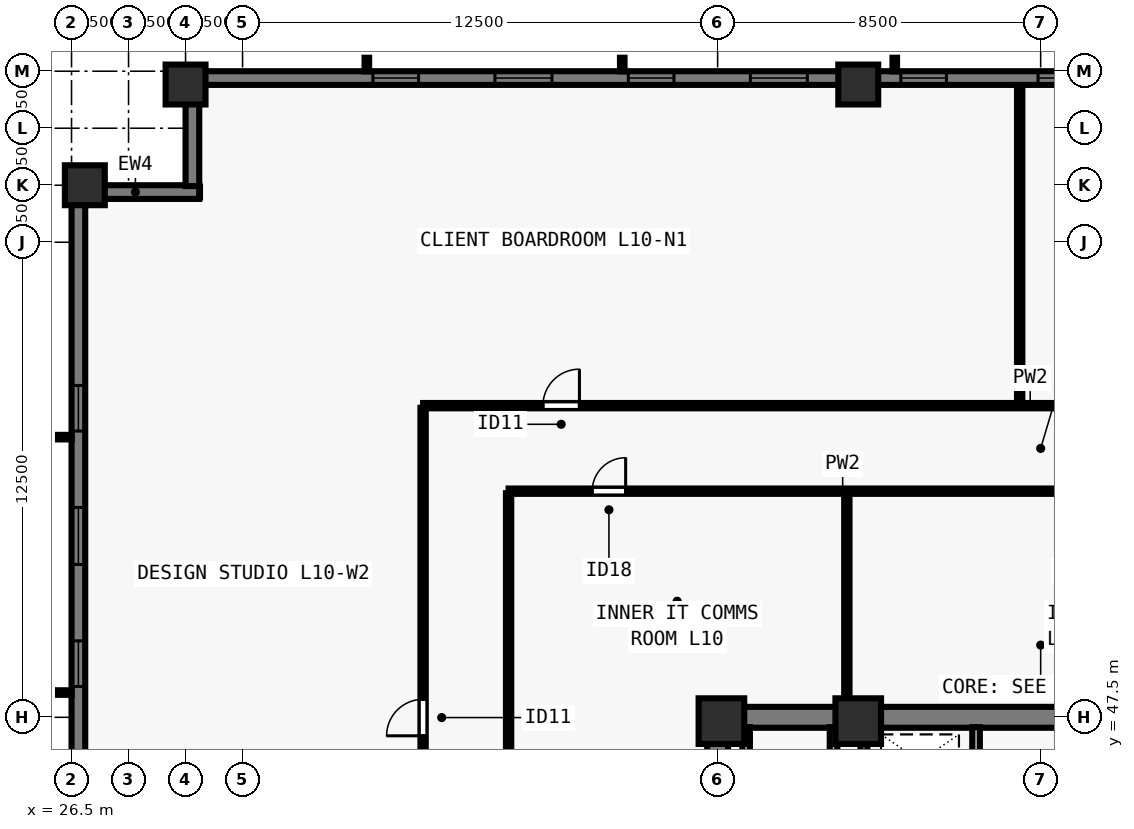
"""IFC4 building model, lengths in metres.
Left out: names, types, materials, properties, quantities, classifications, styles, units other than length and angle.
Written with IfcOpenShell. Run it as: python <this file> out.ifc"""

import sys

from ifc_helpers import new_model, si_unit, direction, frame, frame_2d, origin, origin_2d, place, context, subcontext, project, spatial, rectangle, extrude, element, fill, save


model = new_model("IFC4")
c1 = context("Model", 3, precision=1e-05, world=origin(), true_north=direction((0.0, 1.0)))
c2 = subcontext(c1, "Body", "Model", "MODEL_VIEW")
j1 = project(units=[si_unit("LENGTHUNIT", "METRE"), si_unit("PLANEANGLEUNIT", "RADIAN")], contexts=[c1])
p1 = place(None, origin())
s1 = spatial("IfcSite", under=j1, at=p1, CompositionType="ELEMENT")
p2 = place(p1, origin())
s2 = spatial("IfcBuilding", under=s1, at=p2, CompositionType="ELEMENT")
p3 = place(p2, frame((0.0, 0.0, 41.0)))
s3 = spatial("IfcBuildingStorey", under=s2, at=p3, CompositionType="ELEMENT", Elevation=41.0)
for number, where, z_axis, x_axis in (
    (1, (43.6, 47.4, 0.0), (0.0, 0.0, 1.0), (1.0, 0.0, 0.0)),
    (2, (47.2, 47.4, 0.0), (0.0, 0.0, 1.0), (1.0, 0.0, 0.0)),
):
    element("IfcColumn", number, at=place(p3, frame(where, z_axis=z_axis, x_axis=x_axis)), inside=s3, PredefinedType="COLUMN", context=c2, shape_type="SweptSolid", body=[
        extrude(rectangle(XDim=1.2, YDim=1.2, at=origin_2d()), origin(), (0.0, 0.0, 1.0), 3.5),
    ])
for number, where, z_axis, x_axis in (
    (3, (47.2, 64.15, 0.0), (0.0, 0.0, 1.0), (1.0, 0.0, 0.0)),
    (4, (29.5, 64.15, 0.0), (0.0, 0.0, 1.0), (1.0, 0.0, 0.0)),
    (5, (26.85, 61.5, 0.0), (0.0, 0.0, 1.0), (0.0, 1.0, 0.0)),
):
    element("IfcColumn", number, at=place(p3, frame(where, z_axis=z_axis, x_axis=x_axis)), inside=s3, PredefinedType="COLUMN", context=c2, shape_type="SweptSolid", body=[
        extrude(rectangle(XDim=1.05, YDim=1.05, at=origin_2d()), origin(), (0.0, 0.0, 1.0), 3.5),
    ])
p4 = place(p3, frame((26.68, 16.5, 0.0), z_axis=(0.0, 0.0, 1.0), x_axis=(0.0, 1.0, 0.0)))
e6 = element("IfcWall", 6, at=p4, inside=s3, PredefinedType="SOLIDWALL", context=c2, shape_type="SweptSolid", body=[
    extrude(rectangle(XDim=44.662, YDim=0.36, at=frame_2d((22.331, 0.0))), origin(), (0.0, 0.0, 1.0), 3.28),
])
p5 = place(p4, frame((4.93, 0.0, 0.8)))
e7 = element("IfcOpeningElement", 7, at=p5, cuts=e6, PredefinedType="OPENING", context=c2, shape_type="SweptSolid", body=[
    extrude(rectangle(XDim=1.2, YDim=1.544, at=frame_2d((0.6, 0.772))), frame((0.0, 0.19, 0.0), z_axis=(0.0, -1.0, 0.0), x_axis=(1.0, 0.0, 0.0)), (0.0, 0.0, 1.0), 0.38),
])
p6 = place(p4, frame((8.14, 0.0, 0.8)))
e8 = element("IfcOpeningElement", 8, at=p6, cuts=e6, PredefinedType="OPENING", context=c2, shape_type="SweptSolid", body=[
    extrude(rectangle(XDim=1.5, YDim=1.544, at=frame_2d((0.75, 0.772))), frame((0.0, 0.19, 0.0), z_axis=(0.0, -1.0, 0.0), x_axis=(1.0, 0.0, 0.0)), (0.0, 0.0, 1.0), 0.38),
])
p7 = place(p4, frame((11.65, 0.0, 0.8)))
e9 = element("IfcOpeningElement", 9, at=p7, cuts=e6, PredefinedType="OPENING", context=c2, shape_type="SweptSolid", body=[
    extrude(rectangle(XDim=1.2, YDim=1.544, at=frame_2d((0.6, 0.772))), frame((0.0, 0.19, 0.0), z_axis=(0.0, -1.0, 0.0), x_axis=(1.0, 0.0, 0.0)), (0.0, 0.0, 1.0), 0.38),
])
p8 = place(p4, frame((14.861, 0.0, 0.8)))
e10 = element("IfcOpeningElement", 10, at=p8, cuts=e6, PredefinedType="OPENING", context=c2, shape_type="SweptSolid", body=[
    extrude(rectangle(XDim=1.5, YDim=1.544, at=frame_2d((0.75, 0.772))), frame((0.0, 0.19, 0.0), z_axis=(0.0, -1.0, 0.0), x_axis=(1.0, 0.0, 0.0)), (0.0, 0.0, 1.0), 0.38),
])
p9 = place(p4, frame((18.821, 0.0, 0.8)))
e11 = element("IfcOpeningElement", 11, at=p9, cuts=e6, PredefinedType="OPENING", context=c2, shape_type="SweptSolid", body=[
    extrude(rectangle(XDim=1.2, YDim=1.544, at=frame_2d((0.6, 0.772))), frame((0.0, 0.19, 0.0), z_axis=(0.0, -1.0, 0.0), x_axis=(1.0, 0.0, 0.0)), (0.0, 0.0, 1.0), 0.38),
])
p10 = place(p4, frame((20.731, 0.0, 0.8)))
e12 = element("IfcOpeningElement", 12, at=p10, cuts=e6, PredefinedType="OPENING", context=c2, shape_type="SweptSolid", body=[
    extrude(rectangle(XDim=1.5, YDim=1.544, at=frame_2d((0.75, 0.772))), frame((0.0, 0.19, 0.0), z_axis=(0.0, -1.0, 0.0), x_axis=(1.0, 0.0, 0.0)), (0.0, 0.0, 1.0), 0.38),
])
p11 = place(p4, frame((25.091, 0.0, 0.8)))
e13 = element("IfcOpeningElement", 13, at=p11, cuts=e6, PredefinedType="OPENING", context=c2, shape_type="SweptSolid", body=[
    extrude(rectangle(XDim=1.2, YDim=1.544, at=frame_2d((0.6, 0.772))), frame((0.0, 0.19, 0.0), z_axis=(0.0, -1.0, 0.0), x_axis=(1.0, 0.0, 0.0)), (0.0, 0.0, 1.0), 0.38),
])
p12 = place(p4, frame((28.302, 0.0, 0.8)))
e14 = element("IfcOpeningElement", 14, at=p12, cuts=e6, PredefinedType="OPENING", context=c2, shape_type="SweptSolid", body=[
    extrude(rectangle(XDim=1.5, YDim=1.544, at=frame_2d((0.75, 0.772))), frame((0.0, 0.19, 0.0), z_axis=(0.0, -1.0, 0.0), x_axis=(1.0, 0.0, 0.0)), (0.0, 0.0, 1.0), 0.38),
])
p13 = place(p4, frame((31.812, 0.0, 0.8)))
e15 = element("IfcOpeningElement", 15, at=p13, cuts=e6, PredefinedType="OPENING", context=c2, shape_type="SweptSolid", body=[
    extrude(rectangle(XDim=1.2, YDim=1.544, at=frame_2d((0.6, 0.772))), frame((0.0, 0.19, 0.0), z_axis=(0.0, -1.0, 0.0), x_axis=(1.0, 0.0, 0.0)), (0.0, 0.0, 1.0), 0.38),
])
p14 = place(p4, frame((35.022, 0.0, 0.8)))
e16 = element("IfcOpeningElement", 16, at=p14, cuts=e6, PredefinedType="OPENING", context=c2, shape_type="SweptSolid", body=[
    extrude(rectangle(XDim=1.5, YDim=1.544, at=frame_2d((0.75, 0.772))), frame((0.0, 0.19, 0.0), z_axis=(0.0, -1.0, 0.0), x_axis=(1.0, 0.0, 0.0)), (0.0, 0.0, 1.0), 0.38),
])
p15 = place(p4, frame((38.532, 0.0, 0.8)))
e17 = element("IfcOpeningElement", 17, at=p15, cuts=e6, PredefinedType="OPENING", context=c2, shape_type="SweptSolid", body=[
    extrude(rectangle(XDim=1.2, YDim=1.544, at=frame_2d((0.6, 0.772))), frame((0.0, 0.19, 0.0), z_axis=(0.0, -1.0, 0.0), x_axis=(1.0, 0.0, 0.0)), (0.0, 0.0, 1.0), 0.38),
])
p16 = place(p3, frame((26.5, 61.32, 0.0), z_axis=(0.0, 0.0, 1.0), x_axis=(1.0, 0.0, 0.0)))
e18 = element("IfcWall", 18, at=p16, inside=s3, PredefinedType="SOLIDWALL", context=c2, shape_type="SweptSolid", body=[
    extrude(rectangle(XDim=3.36, YDim=0.36, at=frame_2d((1.68, 0.0))), origin(), (0.0, 0.0, 1.0), 3.28),
])
p17 = place(p3, frame((29.68, 61.478, 0.0), z_axis=(0.0, 0.0, 1.0), x_axis=(0.0, 1.0, 0.0)))
e19 = element("IfcWall", 19, at=p17, inside=s3, PredefinedType="SOLIDWALL", context=c2, shape_type="SweptSolid", body=[
    extrude(rectangle(XDim=2.684, YDim=0.36, at=frame_2d((1.342, 0.0))), origin(), (0.0, 0.0, 1.0), 3.28),
])
p18 = place(p3, frame((29.5, 64.32, 0.0), z_axis=(0.0, 0.0, 1.0), x_axis=(1.0, 0.0, 0.0)))
e20 = element("IfcWall", 20, at=p18, inside=s3, PredefinedType="SOLIDWALL", context=c2, shape_type="SweptSolid", body=[
    extrude(rectangle(XDim=44.662, YDim=0.36, at=frame_2d((22.331, 0.0))), origin(), (0.0, 0.0, 1.0), 3.28),
])
p19 = place(p18, frame((4.93, 0.0, 0.8)))
e21 = element("IfcOpeningElement", 21, at=p19, cuts=e20, PredefinedType="OPENING", context=c2, shape_type="SweptSolid", body=[
    extrude(rectangle(XDim=1.2, YDim=1.544, at=frame_2d((0.6, 0.772))), frame((0.0, 0.19, 0.0), z_axis=(0.0, -1.0, 0.0), x_axis=(1.0, 0.0, 0.0)), (0.0, 0.0, 1.0), 0.38),
])
p20 = place(p18, frame((8.14, 0.0, 0.8)))
e22 = element("IfcOpeningElement", 22, at=p20, cuts=e20, PredefinedType="OPENING", context=c2, shape_type="SweptSolid", body=[
    extrude(rectangle(XDim=1.5, YDim=1.544, at=frame_2d((0.75, 0.772))), frame((0.0, 0.19, 0.0), z_axis=(0.0, -1.0, 0.0), x_axis=(1.0, 0.0, 0.0)), (0.0, 0.0, 1.0), 0.38),
])
p21 = place(p18, frame((11.65, 0.0, 0.8)))
e23 = element("IfcOpeningElement", 23, at=p21, cuts=e20, PredefinedType="OPENING", context=c2, shape_type="SweptSolid", body=[
    extrude(rectangle(XDim=1.2, YDim=1.544, at=frame_2d((0.6, 0.772))), frame((0.0, 0.19, 0.0), z_axis=(0.0, -1.0, 0.0), x_axis=(1.0, 0.0, 0.0)), (0.0, 0.0, 1.0), 0.38),
])
p22 = place(p18, frame((14.861, 0.0, 0.8)))
e24 = element("IfcOpeningElement", 24, at=p22, cuts=e20, PredefinedType="OPENING", context=c2, shape_type="SweptSolid", body=[
    extrude(rectangle(XDim=1.5, YDim=1.544, at=frame_2d((0.75, 0.772))), frame((0.0, 0.19, 0.0), z_axis=(0.0, -1.0, 0.0), x_axis=(1.0, 0.0, 0.0)), (0.0, 0.0, 1.0), 0.38),
])
p23 = place(p18, frame((18.821, 0.0, 0.8)))
e25 = element("IfcOpeningElement", 25, at=p23, cuts=e20, PredefinedType="OPENING", context=c2, shape_type="SweptSolid", body=[
    extrude(rectangle(XDim=1.2, YDim=1.544, at=frame_2d((0.6, 0.772))), frame((0.0, 0.19, 0.0), z_axis=(0.0, -1.0, 0.0), x_axis=(1.0, 0.0, 0.0)), (0.0, 0.0, 1.0), 0.38),
])
p24 = place(p18, frame((22.431, 0.0, 0.8)))
e26 = element("IfcOpeningElement", 26, at=p24, cuts=e20, PredefinedType="OPENING", context=c2, shape_type="SweptSolid", body=[
    extrude(rectangle(XDim=1.5, YDim=1.544, at=frame_2d((0.75, 0.772))), frame((0.0, 0.19, 0.0), z_axis=(0.0, -1.0, 0.0), x_axis=(1.0, 0.0, 0.0)), (0.0, 0.0, 1.0), 0.38),
])
p25 = place(p18, frame((25.091, 0.0, 0.8)))
e27 = element("IfcOpeningElement", 27, at=p25, cuts=e20, PredefinedType="OPENING", context=c2, shape_type="SweptSolid", body=[
    extrude(rectangle(XDim=1.2, YDim=1.544, at=frame_2d((0.6, 0.772))), frame((0.0, 0.19, 0.0), z_axis=(0.0, -1.0, 0.0), x_axis=(1.0, 0.0, 0.0)), (0.0, 0.0, 1.0), 0.38),
])
p26 = place(p18, frame((28.302, 0.0, 0.8)))
e28 = element("IfcOpeningElement", 28, at=p26, cuts=e20, PredefinedType="OPENING", context=c2, shape_type="SweptSolid", body=[
    extrude(rectangle(XDim=1.5, YDim=1.544, at=frame_2d((0.75, 0.772))), frame((0.0, 0.19, 0.0), z_axis=(0.0, -1.0, 0.0), x_axis=(1.0, 0.0, 0.0)), (0.0, 0.0, 1.0), 0.38),
])
p27 = place(p18, frame((31.812, 0.0, 0.8)))
e29 = element("IfcOpeningElement", 29, at=p27, cuts=e20, PredefinedType="OPENING", context=c2, shape_type="SweptSolid", body=[
    extrude(rectangle(XDim=1.2, YDim=1.544, at=frame_2d((0.6, 0.772))), frame((0.0, 0.19, 0.0), z_axis=(0.0, -1.0, 0.0), x_axis=(1.0, 0.0, 0.0)), (0.0, 0.0, 1.0), 0.38),
])
p28 = place(p18, frame((35.022, 0.0, 0.8)))
e30 = element("IfcOpeningElement", 30, at=p28, cuts=e20, PredefinedType="OPENING", context=c2, shape_type="SweptSolid", body=[
    extrude(rectangle(XDim=1.5, YDim=1.544, at=frame_2d((0.75, 0.772))), frame((0.0, 0.19, 0.0), z_axis=(0.0, -1.0, 0.0), x_axis=(1.0, 0.0, 0.0)), (0.0, 0.0, 1.0), 0.38),
])
p29 = place(p18, frame((38.532, 0.0, 0.8)))
e31 = element("IfcOpeningElement", 31, at=p29, cuts=e20, PredefinedType="OPENING", context=c2, shape_type="SweptSolid", body=[
    extrude(rectangle(XDim=1.2, YDim=1.544, at=frame_2d((0.6, 0.772))), frame((0.0, 0.19, 0.0), z_axis=(0.0, -1.0, 0.0), x_axis=(1.0, 0.0, 0.0)), (0.0, 0.0, 1.0), 0.38),
])
p30 = place(p3, frame((43.225, 47.5, 0.0), z_axis=(0.0, 0.0, 1.0), x_axis=(1.0, 0.0, 0.0)))
e32 = element("IfcWall", 32, at=p30, inside=s3, PredefinedType="SHEAR", context=c2, shape_type="SweptSolid", body=[
    extrude(rectangle(XDim=17.55, YDim=0.55, at=frame_2d((8.775, 0.0))), origin(), (0.0, 0.0, 1.0), 3.28),
])
p31 = place(p3, frame((43.5, 40.8, 0.0), z_axis=(0.0, 0.0, 1.0), x_axis=(0.0, 1.0, 0.0)))
e33 = element("IfcWall", 33, at=p31, inside=s3, PredefinedType="SHEAR", context=c2, shape_type="SweptSolid", body=[
    extrude(rectangle(XDim=6.435, YDim=0.55, at=frame_2d((3.218, 0.0))), origin(), (0.0, 0.0, 1.0), 3.28),
])
p32 = place(p3, frame((50.3, 40.585, 0.0), z_axis=(0.0, 0.0, 1.0), x_axis=(0.0, 1.0, 0.0)))
e34 = element("IfcWall", 34, at=p32, inside=s3, PredefinedType="SOLIDWALL", context=c2, shape_type="SweptSolid", body=[
    extrude(rectangle(XDim=6.655, YDim=0.2, at=frame_2d((3.328, 0.0))), origin(), (0.0, 0.0, 1.0), 3.28),
])
p33 = place(p32, frame((5.065, 0.0, 0.0)))
e35 = element("IfcOpeningElement", 35, at=p33, cuts=e34, PredefinedType="OPENING", context=c2, shape_type="SweptSolid", body=[
    extrude(rectangle(XDim=0.8, YDim=2.08, at=frame_2d((0.4, 1.04))), frame((0.0, 0.11, 0.0), z_axis=(0.0, -1.0, 0.0), x_axis=(1.0, 0.0, 0.0)), (0.0, 0.0, 1.0), 0.22),
])
for number, where, z_axis, x_axis in (
    (36, (46.55, 43.735, 0.0), (0.0, 0.0, 1.0), (0.0, 1.0, 0.0)),
    (37, (44.25, 43.735, 0.0), (0.0, 0.0, 1.0), (0.0, 1.0, 0.0)),
):
    element("IfcWall", number, at=place(p3, frame(where, z_axis=z_axis, x_axis=x_axis)), inside=s3, PredefinedType="SOLIDWALL", context=c2, shape_type="SweptSolid", body=[
        extrude(rectangle(XDim=3.505, YDim=0.2, at=frame_2d((1.752, 0.0))), origin(), (0.0, 0.0, 1.0), 3.28),
    ])
p34 = place(p3, frame((47.35, 43.735, 0.0), z_axis=(0.0, 0.0, 1.0), x_axis=(0.0, 1.0, 0.0)))
e38 = element("IfcWall", 38, at=p34, inside=s3, PredefinedType="SOLIDWALL", context=c2, shape_type="SweptSolid", body=[
    extrude(rectangle(XDim=3.505, YDim=0.18, at=frame_2d((1.752, 0.0))), origin(), (0.0, 0.0, 1.0), 3.28),
])
p35 = place(p3, frame((35.75, 55.7, 0.0), z_axis=(0.0, 0.0, 1.0), x_axis=(1.0, 0.0, 0.0)))
e39 = element("IfcWall", 39, at=p35, inside=s3, PredefinedType="PARTITIONING", context=c2, shape_type="SweptSolid", body=[
    extrude(rectangle(XDim=32.5, YDim=0.14, at=frame_2d((16.25, 0.0))), origin(), (0.0, 0.0, 1.0), 3.28),
])
p36 = place(p35, frame((3.154, 0.0, 0.0)))
e40 = element("IfcOpeningElement", 40, at=p36, cuts=e39, PredefinedType="OPENING", context=c2, shape_type="SweptSolid", body=[
    extrude(rectangle(XDim=0.96, YDim=2.12, at=frame_2d((0.48, 1.06))), frame((0.0, 0.08, 0.0), z_axis=(0.0, -1.0, 0.0), x_axis=(1.0, 0.0, 0.0)), (0.0, 0.0, 1.0), 0.16),
])
p37 = place(p35, frame((27.834, 0.0, 0.0)))
e41 = element("IfcOpeningElement", 41, at=p37, cuts=e39, PredefinedType="OPENING", context=c2, shape_type="SweptSolid", body=[
    extrude(rectangle(XDim=0.96, YDim=2.12, at=frame_2d((0.48, 1.06))), frame((0.0, 0.08, 0.0), z_axis=(0.0, -1.0, 0.0), x_axis=(1.0, 0.0, 0.0)), (0.0, 0.0, 1.0), 0.16),
])
p38 = place(p3, frame((35.75, 22.355, 0.0), z_axis=(0.0, 0.0, 1.0), x_axis=(0.0, 1.0, 0.0)))
e42 = element("IfcWall", 42, at=p38, inside=s3, PredefinedType="PARTITIONING", context=c2, shape_type="SweptSolid", body=[
    extrude(rectangle(XDim=33.29, YDim=0.14, at=frame_2d((16.645, 0.0))), origin(), (0.0, 0.0, 1.0), 3.28),
])
p39 = place(p38, frame((8.058, 0.0, 0.0)))
e43 = element("IfcOpeningElement", 43, at=p39, cuts=e42, PredefinedType="OPENING", context=c2, shape_type="SweptSolid", body=[
    extrude(rectangle(XDim=0.96, YDim=2.12, at=frame_2d((0.48, 1.06))), frame((0.0, 0.08, 0.0), z_axis=(0.0, -1.0, 0.0), x_axis=(1.0, 0.0, 0.0)), (0.0, 0.0, 1.0), 0.16),
])
p40 = place(p38, frame((24.658, 0.0, 0.0)))
e44 = element("IfcOpeningElement", 44, at=p40, cuts=e42, PredefinedType="OPENING", context=c2, shape_type="SweptSolid", body=[
    extrude(rectangle(XDim=0.96, YDim=2.12, at=frame_2d((0.48, 1.06))), frame((0.0, 0.08, 0.0), z_axis=(0.0, -1.0, 0.0), x_axis=(1.0, 0.0, 0.0)), (0.0, 0.0, 1.0), 0.16),
])
p41 = place(p3, frame((38.0, 53.45, 0.0), z_axis=(0.0, 0.0, 1.0), x_axis=(1.0, 0.0, 0.0)))
e45 = element("IfcWall", 45, at=p41, inside=s3, PredefinedType="PARTITIONING", context=c2, shape_type="SweptSolid", body=[
    extrude(rectangle(XDim=28.0, YDim=0.14, at=frame_2d((14.0, 0.0))), origin(), (0.0, 0.0, 1.0), 3.28),
])
p42 = place(p41, frame((2.2, 0.0, 0.0)))
e46 = element("IfcOpeningElement", 46, at=p42, cuts=e45, PredefinedType="OPENING", context=c2, shape_type="SweptSolid", body=[
    extrude(rectangle(XDim=0.88, YDim=2.1, at=frame_2d((0.44, 1.05))), frame((0.0, 0.08, 0.0), z_axis=(0.0, -1.0, 0.0), x_axis=(1.0, 0.0, 0.0)), (0.0, 0.0, 1.0), 0.16),
])
p43 = place(p41, frame((14.5, 0.0, 0.0)))
e47 = element("IfcOpeningElement", 47, at=p43, cuts=e45, PredefinedType="OPENING", context=c2, shape_type="SweptSolid", body=[
    extrude(rectangle(XDim=0.88, YDim=2.1, at=frame_2d((0.44, 1.05))), frame((0.0, 0.08, 0.0), z_axis=(0.0, -1.0, 0.0), x_axis=(1.0, 0.0, 0.0)), (0.0, 0.0, 1.0), 0.16),
])
p44 = place(p41, frame((24.0, 0.0, 0.0)))
e48 = element("IfcOpeningElement", 48, at=p44, cuts=e45, PredefinedType="OPENING", context=c2, shape_type="SweptSolid", body=[
    extrude(rectangle(XDim=0.88, YDim=2.1, at=frame_2d((0.44, 1.05))), frame((0.0, 0.08, 0.0), z_axis=(0.0, -1.0, 0.0), x_axis=(1.0, 0.0, 0.0)), (0.0, 0.0, 1.0), 0.16),
])
p45 = place(p3, frame((38.0, 40.8, 0.0), z_axis=(0.0, 0.0, 1.0), x_axis=(0.0, 1.0, 0.0)))
e49 = element("IfcWall", 49, at=p45, inside=s3, PredefinedType="PARTITIONING", context=c2, shape_type="SweptSolid", body=[
    extrude(rectangle(XDim=12.595, YDim=0.14, at=frame_2d((6.297, 0.0))), origin(), (0.0, 0.0, 1.0), 3.28),
])
p46 = place(p45, frame((2.5, 0.0, 0.0)))
e50 = element("IfcOpeningElement", 50, at=p46, cuts=e49, PredefinedType="OPENING", context=c2, shape_type="SweptSolid", body=[
    extrude(rectangle(XDim=0.88, YDim=2.1, at=frame_2d((0.44, 1.05))), frame((0.0, 0.08, 0.0), z_axis=(0.0, -1.0, 0.0), x_axis=(1.0, 0.0, 0.0)), (0.0, 0.0, 1.0), 0.16),
])
p47 = place(p3, frame((46.9, 47.76, 0.0), z_axis=(0.0, 0.0, 1.0), x_axis=(0.0, 1.0, 0.0)))
e51 = element("IfcWall", 51, at=p47, inside=s3, PredefinedType="PARTITIONING", context=c2, shape_type="SweptSolid", body=[
    extrude(rectangle(XDim=5.635, YDim=0.14, at=frame_2d((2.817, 0.0))), origin(), (0.0, 0.0, 1.0), 3.28),
])
p48 = place(p3, frame((51.448, 55.8, 0.0), z_axis=(0.0, 0.0, 1.0), x_axis=(0.0, 1.0, 0.0)))
e52 = element("IfcWall", 52, at=p48, inside=s3, PredefinedType="PARTITIONING", context=c2, shape_type="SweptSolid", body=[
    extrude(rectangle(XDim=8.28, YDim=0.14, at=frame_2d((4.14, 0.0))), origin(), (0.0, 0.0, 1.0), 3.28),
])
p49 = place(p13, origin())
e53 = element("IfcWindow", 53, at=p49, inside=s3, PartitioningType="SINGLE_PANEL", PredefinedType="WINDOW", context=c2, shape_type="SweptSolid", body=[
    extrude(rectangle(XDim=1.2, YDim=1.544, at=frame_2d((0.6, 0.772))), frame((0.0, -0.05, 0.0), z_axis=(0.0, -1.0, 0.0), x_axis=(1.0, 0.0, 0.0)), (0.0, 0.0, 1.0), 0.06),
])
fill(e15, e53)
p50 = place(p14, origin())
e54 = element("IfcWindow", 54, at=p50, inside=s3, PartitioningType="SINGLE_PANEL", PredefinedType="WINDOW", context=c2, shape_type="SweptSolid", body=[
    extrude(rectangle(XDim=1.5, YDim=1.544, at=frame_2d((0.75, 0.772))), frame((0.0, -0.05, 0.0), z_axis=(0.0, -1.0, 0.0), x_axis=(1.0, 0.0, 0.0)), (0.0, 0.0, 1.0), 0.06),
])
fill(e16, e54)
p51 = place(p15, origin())
e55 = element("IfcWindow", 55, at=p51, inside=s3, PartitioningType="SINGLE_PANEL", PredefinedType="WINDOW", context=c2, shape_type="SweptSolid", body=[
    extrude(rectangle(XDim=1.2, YDim=1.544, at=frame_2d((0.6, 0.772))), frame((0.0, -0.05, 0.0), z_axis=(0.0, -1.0, 0.0), x_axis=(1.0, 0.0, 0.0)), (0.0, 0.0, 1.0), 0.06),
])
fill(e17, e55)
p52 = place(p19, origin())
e56 = element("IfcWindow", 56, at=p52, inside=s3, PartitioningType="SINGLE_PANEL", PredefinedType="WINDOW", context=c2, shape_type="SweptSolid", body=[
    extrude(rectangle(XDim=1.2, YDim=1.544, at=frame_2d((0.6, 0.772))), frame((0.0, -0.05, 0.0), z_axis=(0.0, -1.0, 0.0), x_axis=(1.0, 0.0, 0.0)), (0.0, 0.0, 1.0), 0.06),
])
fill(e21, e56)
p53 = place(p20, origin())
e57 = element("IfcWindow", 57, at=p53, inside=s3, PartitioningType="SINGLE_PANEL", PredefinedType="WINDOW", context=c2, shape_type="SweptSolid", body=[
    extrude(rectangle(XDim=1.5, YDim=1.544, at=frame_2d((0.75, 0.772))), frame((0.0, -0.05, 0.0), z_axis=(0.0, -1.0, 0.0), x_axis=(1.0, 0.0, 0.0)), (0.0, 0.0, 1.0), 0.06),
])
fill(e22, e57)
p54 = place(p21, origin())
e58 = element("IfcWindow", 58, at=p54, inside=s3, PartitioningType="SINGLE_PANEL", PredefinedType="WINDOW", context=c2, shape_type="SweptSolid", body=[
    extrude(rectangle(XDim=1.2, YDim=1.544, at=frame_2d((0.6, 0.772))), frame((0.0, -0.05, 0.0), z_axis=(0.0, -1.0, 0.0), x_axis=(1.0, 0.0, 0.0)), (0.0, 0.0, 1.0), 0.06),
])
fill(e23, e58)
p55 = place(p22, origin())
e59 = element("IfcWindow", 59, at=p55, inside=s3, PartitioningType="SINGLE_PANEL", PredefinedType="WINDOW", context=c2, shape_type="SweptSolid", body=[
    extrude(rectangle(XDim=1.5, YDim=1.544, at=frame_2d((0.75, 0.772))), frame((0.0, -0.05, 0.0), z_axis=(0.0, -1.0, 0.0), x_axis=(1.0, 0.0, 0.0)), (0.0, 0.0, 1.0), 0.06),
])
fill(e24, e59)
p56 = place(p23, origin())
e60 = element("IfcWindow", 60, at=p56, inside=s3, PartitioningType="SINGLE_PANEL", PredefinedType="WINDOW", context=c2, shape_type="SweptSolid", body=[
    extrude(rectangle(XDim=1.2, YDim=1.544, at=frame_2d((0.6, 0.772))), frame((0.0, -0.05, 0.0), z_axis=(0.0, -1.0, 0.0), x_axis=(1.0, 0.0, 0.0)), (0.0, 0.0, 1.0), 0.06),
])
fill(e25, e60)
p57 = place(p24, origin())
e61 = element("IfcWindow", 61, at=p57, inside=s3, PartitioningType="SINGLE_PANEL", PredefinedType="WINDOW", context=c2, shape_type="SweptSolid", body=[
    extrude(rectangle(XDim=1.5, YDim=1.544, at=frame_2d((0.75, 0.772))), frame((0.0, -0.05, 0.0), z_axis=(0.0, -1.0, 0.0), x_axis=(1.0, 0.0, 0.0)), (0.0, 0.0, 1.0), 0.06),
])
fill(e26, e61)
p58 = place(p42, origin())
e62 = element("IfcDoor", 62, at=p58, inside=s3, OperationType="SINGLE_SWING_RIGHT", PredefinedType="DOOR", context=c2, shape_type="SweptSolid", body=[
    extrude(rectangle(XDim=0.88, YDim=2.1, at=frame_2d((0.44, 1.05))), frame((0.0, 0.025, 0.0), z_axis=(0.0, -1.0, 0.0), x_axis=(1.0, 0.0, 0.0)), (0.0, 0.0, 1.0), 0.05),
])
fill(e46, e62)
p59 = place(p36, origin())
e63 = element("IfcDoor", 63, at=p59, inside=s3, OperationType="SINGLE_SWING_RIGHT", PredefinedType="DOOR", context=c2, shape_type="SweptSolid", body=[
    extrude(rectangle(XDim=0.96, YDim=2.12, at=frame_2d((0.48, 1.06))), frame((0.0, 0.025, 0.0), z_axis=(0.0, -1.0, 0.0), x_axis=(1.0, 0.0, 0.0)), (0.0, 0.0, 1.0), 0.05),
])
fill(e40, e63)
p60 = place(p40, origin())
e64 = element("IfcDoor", 64, at=p60, inside=s3, OperationType="SINGLE_SWING_LEFT", PredefinedType="DOOR", context=c2, shape_type="SweptSolid", body=[
    extrude(rectangle(XDim=0.96, YDim=2.12, at=frame_2d((0.48, 1.06))), frame((0.0, 0.025, 0.0), z_axis=(0.0, -1.0, 0.0), x_axis=(1.0, 0.0, 0.0)), (0.0, 0.0, 1.0), 0.05),
])
fill(e44, e64)
save(model, sys.argv[1])
